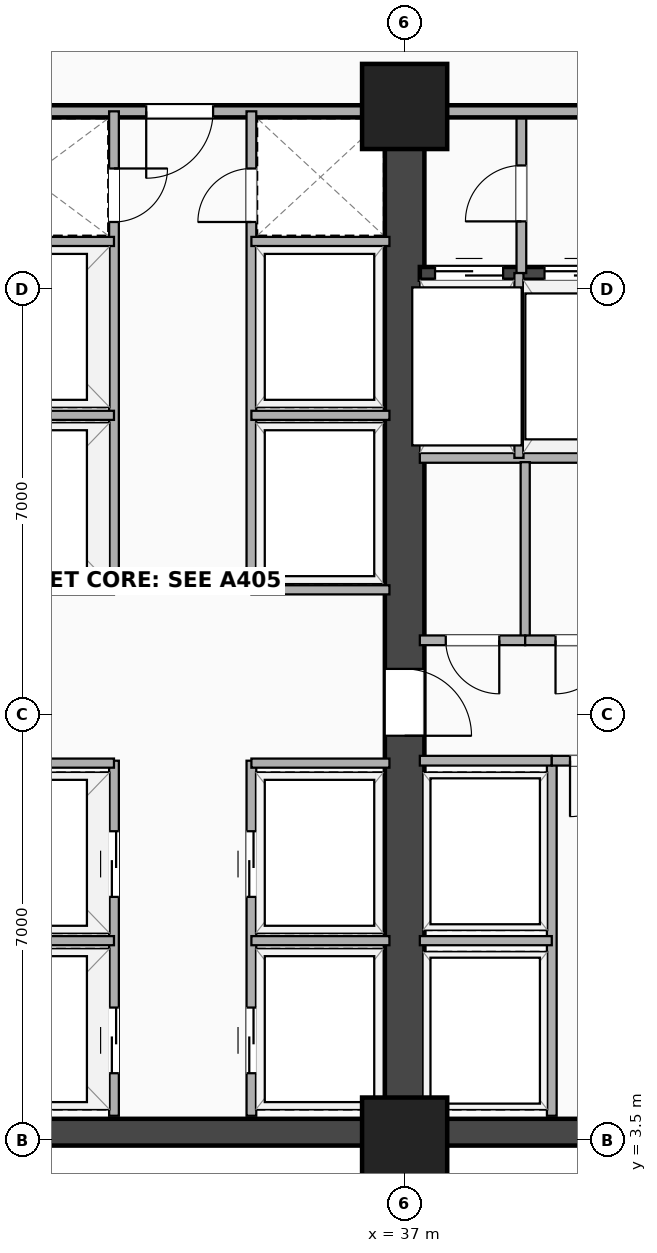
"""IFC4 building model, lengths in metres.
Left out: names, types, materials, properties, quantities, classifications, styles, units other than length and angle.
Written with IfcOpenShell. Run it as: python <this file> out.ifc"""

import sys

from ifc_helpers import new_model, si_unit, direction, frame, frame_2d, origin, origin_2d, place, context, subcontext, project, spatial, rectangle, extrude, element, fill, save


model = new_model("IFC4")
c1 = context("Model", 3, precision=1e-05, world=origin(), true_north=direction((0.0, 1.0)))
c2 = subcontext(c1, "Body", "Model", "MODEL_VIEW")
j1 = project(units=[si_unit("LENGTHUNIT", "METRE"), si_unit("PLANEANGLEUNIT", "RADIAN")], contexts=[c1])
p1 = place(None, origin())
s1 = spatial("IfcSite", under=j1, at=p1, CompositionType="ELEMENT")
p2 = place(p1, origin())
s2 = spatial("IfcBuilding", under=s1, at=p2, CompositionType="ELEMENT")
p3 = place(p2, frame((0.0, 0.0, 64.9)))
s3 = spatial("IfcBuildingStorey", under=s2, at=p3, CompositionType="ELEMENT", Elevation=64.9)
p4 = place(p3, frame((20.3, 3.63, 0.0), z_axis=(0.0, 0.0, 1.0), x_axis=(1.0, 0.0, 0.0)))
e1 = element("IfcWall", 1, at=p4, inside=s3, PredefinedType="SHEAR", context=c2, shape_type="SweptSolid", body=[
    extrude(rectangle(XDim=24.5, YDim=0.44, at=frame_2d((12.25, 0.0))), origin(), (0.0, 0.0, 1.0), 3.22),
])
p5 = place(p3, frame((37.0, 3.5, 0.0), z_axis=(0.0, 0.0, 1.0), x_axis=(0.0, 1.0, 0.0)))
e2 = element("IfcWall", 2, at=p5, inside=s3, PredefinedType="SHEAR", context=c2, shape_type="SweptSolid", body=[
    extrude(rectangle(XDim=16.9, YDim=0.65, at=frame_2d((8.45, 0.0))), origin(), (0.0, 0.0, 1.0), 3.22),
])
p6 = place(p5, frame((6.65, 0.0, 0.0)))
e3 = element("IfcOpeningElement", 3, at=p6, cuts=e2, PredefinedType="OPENING", context=c2, shape_type="SweptSolid", body=[
    extrude(rectangle(XDim=1.1, YDim=2.15, at=frame_2d((0.55, 1.075))), frame((0.0, 0.335, 0.0), z_axis=(0.0, -1.0, 0.0), x_axis=(1.0, 0.0, 0.0)), (0.0, 0.0, 1.0), 0.67),
])
p7 = place(p3, frame((37.25, 17.755, 0.0), z_axis=(0.0, 0.0, 1.0), x_axis=(1.0, 0.0, 0.0)))
e4 = element("IfcWall", 4, at=p7, inside=s3, PredefinedType="SHEAR", context=c2, shape_type="SweptSolid", body=[
    extrude(rectangle(XDim=7.2, YDim=0.21, at=frame_2d((3.6, 0.0))), origin(), (0.0, 0.0, 1.0), 3.22),
])
p8 = place(p7, frame((0.25, 0.0, 0.0)))
e5 = element("IfcOpeningElement", 5, at=p8, cuts=e4, PredefinedType="OPENING", context=c2, shape_type="SweptSolid", body=[
    extrude(rectangle(XDim=1.12, YDim=2.2, at=frame_2d((0.56, 1.1))), frame((0.0, 0.115, 0.0), z_axis=(0.0, -1.0, 0.0), x_axis=(1.0, 0.0, 0.0)), (0.0, 0.0, 1.0), 0.23),
])
p9 = place(p7, frame((2.05, 0.0, 0.0)))
e6 = element("IfcOpeningElement", 6, at=p9, cuts=e4, PredefinedType="OPENING", context=c2, shape_type="SweptSolid", body=[
    extrude(rectangle(XDim=1.1, YDim=2.18, at=frame_2d((0.55, 1.09))), frame((0.0, 0.115, 0.0), z_axis=(0.0, -1.0, 0.0), x_axis=(1.0, 0.0, 0.0)), (0.0, 0.0, 1.0), 0.23),
])
p10 = place(p7, frame((5.78, 0.0, 0.0), z_axis=(0.0, 0.0, 1.0), x_axis=(-1.0, 0.0, 0.0)))
e7 = element("IfcOpeningElement", 7, at=p10, cuts=e4, PredefinedType="OPENING", context=c2, shape_type="SweptSolid", body=[
    extrude(rectangle(XDim=1.05, YDim=2.15, at=frame_2d((0.525, 1.075))), frame((0.0, 0.115, 0.0), z_axis=(0.0, -1.0, 0.0), x_axis=(1.0, 0.0, 0.0)), (0.0, 0.0, 1.0), 0.23),
])
for number, where, z_axis, x_axis in (
    (8, (37.0, 3.5, -0.28), (0.0, 0.0, 1.0), (1.0, 0.0, 0.0)),
    (9, (37.0, 20.5, -0.28), (0.0, 0.0, 1.0), (1.0, 0.0, 0.0)),
):
    element("IfcColumn", number, at=place(p3, frame(where, z_axis=z_axis, x_axis=x_axis)), inside=s3, PredefinedType="COLUMN", context=c2, shape_type="SweptSolid", body=[
        extrude(rectangle(XDim=1.4, YDim=1.4, at=origin_2d()), origin(), (0.0, 0.0, 1.0), 3.5),
    ])
p11 = place(p3, frame((38.92, 17.76, 0.0), z_axis=(0.0, 0.0, 1.0), x_axis=(0.0, 1.0, 0.0)))
e10 = element("IfcWall", 10, at=p11, inside=s3, PredefinedType="PARTITIONING", context=c2, shape_type="SweptSolid", body=[
    extrude(rectangle(XDim=2.66, YDim=0.16, at=frame_2d((1.33, 0.0))), origin(), (0.0, 0.0, 1.0), 2.51),
])
p12 = place(p11, frame((1.77, 0.0, 0.0), z_axis=(0.0, 0.0, 1.0), x_axis=(-1.0, 0.0, 0.0)))
e11 = element("IfcOpeningElement", 11, at=p12, cuts=e10, PredefinedType="OPENING", context=c2, shape_type="SweptSolid", body=[
    extrude(rectangle(XDim=0.92, YDim=2.08, at=frame_2d((0.46, 1.04))), frame((0.0, 0.09, 0.0), z_axis=(0.0, -1.0, 0.0), x_axis=(1.0, 0.0, 0.0)), (0.0, 0.0, 1.0), 0.18),
])
p13 = place(p3, frame((37.25, 14.72, 0.0), z_axis=(0.0, 0.0, 1.0), x_axis=(1.0, 0.0, 0.0)))
e12 = element("IfcWall", 12, at=p13, inside=s3, PredefinedType="PARTITIONING", context=c2, shape_type="SweptSolid", body=[
    extrude(rectangle(XDim=3.61, YDim=0.16, at=frame_2d((1.805, 0.0))), origin(), (0.0, 0.0, 1.0), 3.22),
])
p14 = place(p3, frame((38.88, 14.72, 0.0), z_axis=(0.0, 0.0, 1.0), x_axis=(0.0, 1.0, 0.0)))
e13 = element("IfcWall", 13, at=p14, inside=s3, PredefinedType="PARTITIONING", context=c2, shape_type="SweptSolid", body=[
    extrude(rectangle(XDim=3.04, YDim=0.15, at=frame_2d((1.52, 0.0))), origin(), (0.0, 0.0, 1.0), 3.22),
])
p15 = place(p3, frame((29.2, 20.42, 0.0), z_axis=(0.0, 0.0, 1.0), x_axis=(1.0, 0.0, 0.0)))
e14 = element("IfcWall", 14, at=p15, inside=s3, PredefinedType="PARTITIONING", context=c2, shape_type="SweptSolid", body=[
    extrude(rectangle(XDim=7.8, YDim=0.2, at=frame_2d((3.9, 0.0))), origin(), (0.0, 0.0, 1.0), 2.51),
])
p16 = place(p15, frame((3.55, 0.0, 0.0)))
e15 = element("IfcOpeningElement", 15, at=p16, cuts=e14, PredefinedType="OPENING", context=c2, shape_type="SweptSolid", body=[
    extrude(rectangle(XDim=1.1, YDim=2.15, at=frame_2d((0.55, 1.075))), frame((0.0, 0.11, 0.0), z_axis=(0.0, -1.0, 0.0), x_axis=(1.0, 0.0, 0.0)), (0.0, 0.0, 1.0), 0.22),
])
p17 = place(p3, frame((37.0, 20.42, 0.0), z_axis=(0.0, 0.0, 1.0), x_axis=(1.0, 0.0, 0.0)))
e16 = element("IfcWall", 16, at=p17, inside=s3, PredefinedType="PARTITIONING", context=c2, shape_type="SweptSolid", body=[
    extrude(rectangle(XDim=7.45, YDim=0.2, at=frame_2d((3.725, 0.0))), origin(), (0.0, 0.0, 1.0), 2.51),
])
p18 = place(p17, frame((4.2, 0.0, 0.0)))
e17 = element("IfcOpeningElement", 17, at=p18, cuts=e16, PredefinedType="OPENING", context=c2, shape_type="SweptSolid", body=[
    extrude(rectangle(XDim=1.1, YDim=2.15, at=frame_2d((0.55, 1.075))), frame((0.0, 0.11, 0.0), z_axis=(0.0, -1.0, 0.0), x_axis=(1.0, 0.0, 0.0)), (0.0, 0.0, 1.0), 0.22),
])
p19 = place(p3, frame((38.983, 11.72, 0.0), z_axis=(0.0, 0.0, 1.0), x_axis=(0.0, 1.0, 0.0)))
e18 = element("IfcWall", 18, at=p19, inside=s3, PredefinedType="PARTITIONING", context=c2, shape_type="SweptSolid", body=[
    extrude(rectangle(XDim=2.93, YDim=0.15, at=frame_2d((1.465, 0.0))), origin(), (0.0, 0.0, 1.0), 3.22),
])
p20 = place(p3, frame((37.25, 11.72, 0.0), z_axis=(0.0, 0.0, 1.0), x_axis=(1.0, 0.0, 0.0)))
e19 = element("IfcWall", 19, at=p20, inside=s3, PredefinedType="PARTITIONING", context=c2, shape_type="SweptSolid", body=[
    extrude(rectangle(XDim=1.733, YDim=0.16, at=frame_2d((0.866, 0.0))), origin(), (0.0, 0.0, 1.0), 3.22),
])
p21 = place(p20, frame((0.427, 0.0, 0.0)))
e20 = element("IfcOpeningElement", 20, at=p21, cuts=e19, PredefinedType="OPENING", context=c2, shape_type="SweptSolid", body=[
    extrude(rectangle(XDim=0.88, YDim=2.08, at=frame_2d((0.44, 1.04))), frame((0.0, 0.09, 0.0), z_axis=(0.0, -1.0, 0.0), x_axis=(1.0, 0.0, 0.0)), (0.0, 0.0, 1.0), 0.18),
])
p22 = place(p3, frame((38.983, 11.72, 0.0), z_axis=(0.0, 0.0, 1.0), x_axis=(1.0, 0.0, 0.0)))
e21 = element("IfcWall", 21, at=p22, inside=s3, PredefinedType="PARTITIONING", context=c2, shape_type="SweptSolid", body=[
    extrude(rectangle(XDim=1.877, YDim=0.16, at=frame_2d((0.938, 0.0))), origin(), (0.0, 0.0, 1.0), 3.22),
])
p23 = place(p22, frame((0.499, 0.0, 0.0)))
e22 = element("IfcOpeningElement", 22, at=p23, cuts=e21, PredefinedType="OPENING", context=c2, shape_type="SweptSolid", body=[
    extrude(rectangle(XDim=0.88, YDim=2.08, at=frame_2d((0.44, 1.04))), frame((0.0, 0.09, 0.0), z_axis=(0.0, -1.0, 0.0), x_axis=(1.0, 0.0, 0.0)), (0.0, 0.0, 1.0), 0.18),
])
p24 = place(p3, frame((39.42, 3.9, 0.0), z_axis=(0.0, 0.0, 1.0), x_axis=(0.0, 1.0, 0.0)))
e23 = element("IfcWall", 23, at=p24, inside=s3, PredefinedType="PARTITIONING", context=c2, shape_type="SweptSolid", body=[
    extrude(rectangle(XDim=5.84, YDim=0.16, at=frame_2d((2.92, 0.0))), origin(), (0.0, 0.0, 1.0), 3.22),
])
p25 = place(p3, frame((37.25, 6.78, 0.0), z_axis=(0.0, 0.0, 1.0), x_axis=(1.0, 0.0, 0.0)))
e24 = element("IfcWall", 24, at=p25, inside=s3, PredefinedType="PARTITIONING", context=c2, shape_type="SweptSolid", body=[
    extrude(rectangle(XDim=2.17, YDim=0.15, at=frame_2d((1.085, 0.0))), origin(), (0.0, 0.0, 1.0), 3.22),
])
p26 = place(p3, frame((37.25, 9.74, 0.0), z_axis=(0.0, 0.0, 1.0), x_axis=(1.0, 0.0, 0.0)))
e25 = element("IfcWall", 25, at=p26, inside=s3, PredefinedType="PARTITIONING", context=c2, shape_type="SweptSolid", body=[
    extrude(rectangle(XDim=2.17, YDim=0.16, at=frame_2d((1.085, 0.0))), origin(), (0.0, 0.0, 1.0), 3.22),
])
p27 = place(p3, frame((39.42, 9.74, 0.0), z_axis=(0.0, 0.0, 1.0), x_axis=(1.0, 0.0, 0.0)))
e26 = element("IfcWall", 26, at=p27, inside=s3, PredefinedType="PARTITIONING", context=c2, shape_type="SweptSolid", body=[
    extrude(rectangle(XDim=1.56, YDim=0.16, at=frame_2d((0.78, 0.0))), origin(), (0.0, 0.0, 1.0), 3.22),
])
p28 = place(p27, frame((0.3, 0.0, 0.0)))
e27 = element("IfcOpeningElement", 27, at=p28, cuts=e26, PredefinedType="OPENING", context=c2, shape_type="SweptSolid", body=[
    extrude(rectangle(XDim=0.92, YDim=2.08, at=frame_2d((0.46, 1.04))), frame((0.0, 0.09, 0.0), z_axis=(0.0, -1.0, 0.0), x_axis=(1.0, 0.0, 0.0)), (0.0, 0.0, 1.0), 0.18),
])
p29 = place(p3, frame((32.22, 3.9, 0.0), z_axis=(0.0, 0.0, 1.0), x_axis=(0.0, 1.0, 0.0)))
e28 = element("IfcWall", 28, at=p29, inside=s3, PredefinedType="PARTITIONING", context=c2, shape_type="SweptSolid", body=[
    extrude(rectangle(XDim=5.84, YDim=0.16, at=frame_2d((2.92, 0.0))), origin(), (0.0, 0.0, 1.0), 3.22),
])
p30 = place(p29, frame((1.78, 0.0, 0.0), z_axis=(0.0, 0.0, 1.0), x_axis=(-1.0, 0.0, 0.0)))
e29 = element("IfcOpeningElement", 29, at=p30, cuts=e28, PredefinedType="OPENING", context=c2, shape_type="SweptSolid", body=[
    extrude(rectangle(XDim=1.08, YDim=2.16, at=frame_2d((0.54, 1.08))), frame((0.0, 0.09, 0.0), z_axis=(0.0, -1.0, 0.0), x_axis=(1.0, 0.0, 0.0)), (0.0, 0.0, 1.0), 0.18),
])
p31 = place(p29, frame((4.68, 0.0, 0.0), z_axis=(0.0, 0.0, 1.0), x_axis=(-1.0, 0.0, 0.0)))
e30 = element("IfcOpeningElement", 30, at=p31, cuts=e28, PredefinedType="OPENING", context=c2, shape_type="SweptSolid", body=[
    extrude(rectangle(XDim=1.08, YDim=2.16, at=frame_2d((0.54, 1.08))), frame((0.0, 0.09, 0.0), z_axis=(0.0, -1.0, 0.0), x_axis=(1.0, 0.0, 0.0)), (0.0, 0.0, 1.0), 0.18),
])
p32 = place(p3, frame((34.48, 3.9, 0.0), z_axis=(0.0, 0.0, 1.0), x_axis=(0.0, 1.0, 0.0)))
e31 = element("IfcWall", 31, at=p32, inside=s3, PredefinedType="PARTITIONING", context=c2, shape_type="SweptSolid", body=[
    extrude(rectangle(XDim=5.84, YDim=0.16, at=frame_2d((2.92, 0.0))), origin(), (0.0, 0.0, 1.0), 3.22),
])
p33 = place(p32, frame((0.7, 0.0, 0.0)))
e32 = element("IfcOpeningElement", 32, at=p33, cuts=e31, PredefinedType="OPENING", context=c2, shape_type="SweptSolid", body=[
    extrude(rectangle(XDim=1.08, YDim=2.16, at=frame_2d((0.54, 1.08))), frame((0.0, 0.09, 0.0), z_axis=(0.0, -1.0, 0.0), x_axis=(1.0, 0.0, 0.0)), (0.0, 0.0, 1.0), 0.18),
])
p34 = place(p32, frame((3.6, 0.0, 0.0)))
e33 = element("IfcOpeningElement", 33, at=p34, cuts=e31, PredefinedType="OPENING", context=c2, shape_type="SweptSolid", body=[
    extrude(rectangle(XDim=1.08, YDim=2.16, at=frame_2d((0.54, 1.08))), frame((0.0, 0.09, 0.0), z_axis=(0.0, -1.0, 0.0), x_axis=(1.0, 0.0, 0.0)), (0.0, 0.0, 1.0), 0.18),
])
p35 = place(p3, frame((29.45, 6.78, 0.0), z_axis=(0.0, 0.0, 1.0), x_axis=(1.0, 0.0, 0.0)))
e34 = element("IfcWall", 34, at=p35, inside=s3, PredefinedType="PARTITIONING", context=c2, shape_type="SweptSolid", body=[
    extrude(rectangle(XDim=2.77, YDim=0.15, at=frame_2d((1.385, 0.0))), origin(), (0.0, 0.0, 1.0), 3.22),
])
p36 = place(p3, frame((34.48, 6.78, 0.0), z_axis=(0.0, 0.0, 1.0), x_axis=(1.0, 0.0, 0.0)))
e35 = element("IfcWall", 35, at=p36, inside=s3, PredefinedType="PARTITIONING", context=c2, shape_type="SweptSolid", body=[
    extrude(rectangle(XDim=2.27, YDim=0.15, at=frame_2d((1.135, 0.0))), origin(), (0.0, 0.0, 1.0), 3.22),
])
p37 = place(p3, frame((29.45, 9.7, 0.0), z_axis=(0.0, 0.0, 1.0), x_axis=(1.0, 0.0, 0.0)))
e36 = element("IfcWall", 36, at=p37, inside=s3, PredefinedType="PARTITIONING", context=c2, shape_type="SweptSolid", body=[
    extrude(rectangle(XDim=2.77, YDim=0.15, at=frame_2d((1.385, 0.0))), origin(), (0.0, 0.0, 1.0), 3.22),
])
p38 = place(p3, frame((34.48, 9.7, 0.0), z_axis=(0.0, 0.0, 1.0), x_axis=(1.0, 0.0, 0.0)))
e37 = element("IfcWall", 37, at=p38, inside=s3, PredefinedType="PARTITIONING", context=c2, shape_type="SweptSolid", body=[
    extrude(rectangle(XDim=2.27, YDim=0.15, at=frame_2d((1.135, 0.0))), origin(), (0.0, 0.0, 1.0), 3.22),
])
p39 = place(p3, frame((32.22, 12.5, 0.0), z_axis=(0.0, 0.0, 1.0), x_axis=(0.0, 1.0, 0.0)))
e38 = element("IfcWall", 38, at=p39, inside=s3, PredefinedType="PARTITIONING", context=c2, shape_type="SweptSolid", body=[
    extrude(rectangle(XDim=7.92, YDim=0.16, at=frame_2d((3.96, 0.0))), origin(), (0.0, 0.0, 1.0), 2.51),
])
p40 = place(p39, frame((6.1, 0.0, 0.0)))
e39 = element("IfcOpeningElement", 39, at=p40, cuts=e38, PredefinedType="OPENING", context=c2, shape_type="SweptSolid", body=[
    extrude(rectangle(XDim=0.88, YDim=2.08, at=frame_2d((0.44, 1.04))), frame((0.0, 0.09, 0.0), z_axis=(0.0, -1.0, 0.0), x_axis=(1.0, 0.0, 0.0)), (0.0, 0.0, 1.0), 0.18),
])
p41 = place(p3, frame((34.48, 12.5, 0.0), z_axis=(0.0, 0.0, 1.0), x_axis=(0.0, 1.0, 0.0)))
e40 = element("IfcWall", 40, at=p41, inside=s3, PredefinedType="PARTITIONING", context=c2, shape_type="SweptSolid", body=[
    extrude(rectangle(XDim=7.92, YDim=0.16, at=frame_2d((3.96, 0.0))), origin(), (0.0, 0.0, 1.0), 2.51),
])
p42 = place(p41, frame((6.98, 0.0, 0.0), z_axis=(0.0, 0.0, 1.0), x_axis=(-1.0, 0.0, 0.0)))
e41 = element("IfcOpeningElement", 41, at=p42, cuts=e40, PredefinedType="OPENING", context=c2, shape_type="SweptSolid", body=[
    extrude(rectangle(XDim=0.88, YDim=2.08, at=frame_2d((0.44, 1.04))), frame((0.0, 0.09, 0.0), z_axis=(0.0, -1.0, 0.0), x_axis=(1.0, 0.0, 0.0)), (0.0, 0.0, 1.0), 0.18),
])
p43 = place(p3, frame((29.45, 12.55, 0.0), z_axis=(0.0, 0.0, 1.0), x_axis=(1.0, 0.0, 0.0)))
e42 = element("IfcWall", 42, at=p43, inside=s3, PredefinedType="PARTITIONING", context=c2, shape_type="SweptSolid", body=[
    extrude(rectangle(XDim=2.77, YDim=0.15, at=frame_2d((1.385, 0.0))), origin(), (0.0, 0.0, 1.0), 3.22),
])
p44 = place(p3, frame((34.48, 12.55, 0.0), z_axis=(0.0, 0.0, 1.0), x_axis=(1.0, 0.0, 0.0)))
e43 = element("IfcWall", 43, at=p44, inside=s3, PredefinedType="PARTITIONING", context=c2, shape_type="SweptSolid", body=[
    extrude(rectangle(XDim=2.27, YDim=0.15, at=frame_2d((1.135, 0.0))), origin(), (0.0, 0.0, 1.0), 3.22),
])
p45 = place(p3, frame((29.45, 15.42, 0.0), z_axis=(0.0, 0.0, 1.0), x_axis=(1.0, 0.0, 0.0)))
e44 = element("IfcWall", 44, at=p45, inside=s3, PredefinedType="PARTITIONING", context=c2, shape_type="SweptSolid", body=[
    extrude(rectangle(XDim=2.77, YDim=0.15, at=frame_2d((1.385, 0.0))), origin(), (0.0, 0.0, 1.0), 3.22),
])
p46 = place(p3, frame((34.48, 15.42, 0.0), z_axis=(0.0, 0.0, 1.0), x_axis=(1.0, 0.0, 0.0)))
e45 = element("IfcWall", 45, at=p46, inside=s3, PredefinedType="PARTITIONING", context=c2, shape_type="SweptSolid", body=[
    extrude(rectangle(XDim=2.27, YDim=0.15, at=frame_2d((1.135, 0.0))), origin(), (0.0, 0.0, 1.0), 3.22),
])
p47 = place(p3, frame((29.45, 18.28, 0.0), z_axis=(0.0, 0.0, 1.0), x_axis=(1.0, 0.0, 0.0)))
e46 = element("IfcWall", 46, at=p47, inside=s3, PredefinedType="PARTITIONING", context=c2, shape_type="SweptSolid", body=[
    extrude(rectangle(XDim=2.77, YDim=0.15, at=frame_2d((1.385, 0.0))), origin(), (0.0, 0.0, 1.0), 3.22),
])
p48 = place(p3, frame((34.48, 18.28, 0.0), z_axis=(0.0, 0.0, 1.0), x_axis=(1.0, 0.0, 0.0)))
e47 = element("IfcWall", 47, at=p48, inside=s3, PredefinedType="PARTITIONING", context=c2, shape_type="SweptSolid", body=[
    extrude(rectangle(XDim=2.27, YDim=0.15, at=frame_2d((1.135, 0.0))), origin(), (0.0, 0.0, 1.0), 3.22),
])
p49 = place(p8, origin())
e48 = element("IfcDoor", 48, at=p49, inside=s3, OperationType="DOUBLE_DOOR_SLIDING", PredefinedType="DOOR", context=c2, shape_type="SweptSolid", body=[
    extrude(rectangle(XDim=1.12, YDim=2.2, at=frame_2d((0.56, 1.1))), frame((0.0, 0.025, 0.0), z_axis=(0.0, -1.0, 0.0), x_axis=(1.0, 0.0, 0.0)), (0.0, 0.0, 1.0), 0.05),
])
fill(e5, e48)
p50 = place(p9, origin())
e49 = element("IfcDoor", 49, at=p50, inside=s3, OperationType="DOUBLE_DOOR_SLIDING", PredefinedType="DOOR", context=c2, shape_type="SweptSolid", body=[
    extrude(rectangle(XDim=1.1, YDim=2.18, at=frame_2d((0.55, 1.09))), frame((0.0, 0.025, 0.0), z_axis=(0.0, -1.0, 0.0), x_axis=(1.0, 0.0, 0.0)), (0.0, 0.0, 1.0), 0.05),
])
fill(e6, e49)
p51 = place(p6, origin())
e50 = element("IfcDoor", 50, at=p51, inside=s3, OperationType="SINGLE_SWING_LEFT", PredefinedType="DOOR", context=c2, shape_type="SweptSolid", body=[
    extrude(rectangle(XDim=1.1, YDim=2.15, at=frame_2d((0.55, 1.075))), frame((0.0, 0.025, 0.0), z_axis=(0.0, -1.0, 0.0), x_axis=(1.0, 0.0, 0.0)), (0.0, 0.0, 1.0), 0.05),
])
fill(e3, e50)
p52 = place(p12, origin())
e51 = element("IfcDoor", 51, at=p52, inside=s3, OperationType="SINGLE_SWING_LEFT", PredefinedType="DOOR", context=c2, shape_type="SweptSolid", body=[
    extrude(rectangle(XDim=0.92, YDim=2.08, at=frame_2d((0.46, 1.04))), frame((0.0, 0.025, 0.0), z_axis=(0.0, -1.0, 0.0), x_axis=(1.0, 0.0, 0.0)), (0.0, 0.0, 1.0), 0.05),
])
fill(e11, e51)
p53 = place(p16, origin())
e52 = element("IfcDoor", 52, at=p53, inside=s3, OperationType="SINGLE_SWING_LEFT", PredefinedType="DOOR", context=c2, shape_type="SweptSolid", body=[
    extrude(rectangle(XDim=1.1, YDim=2.15, at=frame_2d((0.55, 1.075))), frame((0.0, 0.025, 0.0), z_axis=(0.0, -1.0, 0.0), x_axis=(1.0, 0.0, 0.0)), (0.0, 0.0, 1.0), 0.05),
])
fill(e15, e52)
p54 = place(p21, origin())
e53 = element("IfcDoor", 53, at=p54, inside=s3, OperationType="SINGLE_SWING_RIGHT", PredefinedType="DOOR", context=c2, shape_type="SweptSolid", body=[
    extrude(rectangle(XDim=0.88, YDim=2.08, at=frame_2d((0.44, 1.04))), frame((0.0, 0.025, 0.0), z_axis=(0.0, -1.0, 0.0), x_axis=(1.0, 0.0, 0.0)), (0.0, 0.0, 1.0), 0.05),
])
fill(e20, e53)
p55 = place(p23, origin())
e54 = element("IfcDoor", 54, at=p55, inside=s3, OperationType="SINGLE_SWING_LEFT", PredefinedType="DOOR", context=c2, shape_type="SweptSolid", body=[
    extrude(rectangle(XDim=0.88, YDim=2.08, at=frame_2d((0.44, 1.04))), frame((0.0, 0.025, 0.0), z_axis=(0.0, -1.0, 0.0), x_axis=(1.0, 0.0, 0.0)), (0.0, 0.0, 1.0), 0.05),
])
fill(e22, e54)
p56 = place(p28, origin())
e55 = element("IfcDoor", 55, at=p56, inside=s3, OperationType="SINGLE_SWING_LEFT", PredefinedType="DOOR", context=c2, shape_type="SweptSolid", body=[
    extrude(rectangle(XDim=0.92, YDim=2.08, at=frame_2d((0.46, 1.04))), frame((0.0, 0.025, 0.0), z_axis=(0.0, -1.0, 0.0), x_axis=(1.0, 0.0, 0.0)), (0.0, 0.0, 1.0), 0.05),
])
fill(e27, e55)
p57 = place(p30, origin())
e56 = element("IfcDoor", 56, at=p57, inside=s3, OperationType="DOUBLE_DOOR_SLIDING", PredefinedType="DOOR", context=c2, shape_type="SweptSolid", body=[
    extrude(rectangle(XDim=1.08, YDim=2.16, at=frame_2d((0.54, 1.08))), frame((0.0, 0.025, 0.0), z_axis=(0.0, -1.0, 0.0), x_axis=(1.0, 0.0, 0.0)), (0.0, 0.0, 1.0), 0.05),
])
fill(e29, e56)
p58 = place(p31, origin())
e57 = element("IfcDoor", 57, at=p58, inside=s3, OperationType="DOUBLE_DOOR_SLIDING", PredefinedType="DOOR", context=c2, shape_type="SweptSolid", body=[
    extrude(rectangle(XDim=1.08, YDim=2.16, at=frame_2d((0.54, 1.08))), frame((0.0, 0.025, 0.0), z_axis=(0.0, -1.0, 0.0), x_axis=(1.0, 0.0, 0.0)), (0.0, 0.0, 1.0), 0.05),
])
fill(e30, e57)
p59 = place(p33, origin())
e58 = element("IfcDoor", 58, at=p59, inside=s3, OperationType="DOUBLE_DOOR_SLIDING", PredefinedType="DOOR", context=c2, shape_type="SweptSolid", body=[
    extrude(rectangle(XDim=1.08, YDim=2.16, at=frame_2d((0.54, 1.08))), frame((0.0, 0.025, 0.0), z_axis=(0.0, -1.0, 0.0), x_axis=(1.0, 0.0, 0.0)), (0.0, 0.0, 1.0), 0.05),
])
fill(e32, e58)
p60 = place(p34, origin())
e59 = element("IfcDoor", 59, at=p60, inside=s3, OperationType="DOUBLE_DOOR_SLIDING", PredefinedType="DOOR", context=c2, shape_type="SweptSolid", body=[
    extrude(rectangle(XDim=1.08, YDim=2.16, at=frame_2d((0.54, 1.08))), frame((0.0, 0.025, 0.0), z_axis=(0.0, -1.0, 0.0), x_axis=(1.0, 0.0, 0.0)), (0.0, 0.0, 1.0), 0.05),
])
fill(e33, e59)
p61 = place(p40, origin())
e60 = element("IfcDoor", 60, at=p61, inside=s3, OperationType="SINGLE_SWING_RIGHT", PredefinedType="DOOR", context=c2, shape_type="SweptSolid", body=[
    extrude(rectangle(XDim=0.88, YDim=2.08, at=frame_2d((0.44, 1.04))), frame((0.0, 0.025, 0.0), z_axis=(0.0, -1.0, 0.0), x_axis=(1.0, 0.0, 0.0)), (0.0, 0.0, 1.0), 0.05),
])
fill(e39, e60)
p62 = place(p42, origin())
e61 = element("IfcDoor", 61, at=p62, inside=s3, OperationType="SINGLE_SWING_LEFT", PredefinedType="DOOR", context=c2, shape_type="SweptSolid", body=[
    extrude(rectangle(XDim=0.88, YDim=2.08, at=frame_2d((0.44, 1.04))), frame((0.0, 0.025, 0.0), z_axis=(0.0, -1.0, 0.0), x_axis=(1.0, 0.0, 0.0)), (0.0, 0.0, 1.0), 0.05),
])
fill(e41, e61)
save(model, sys.argv[1])
